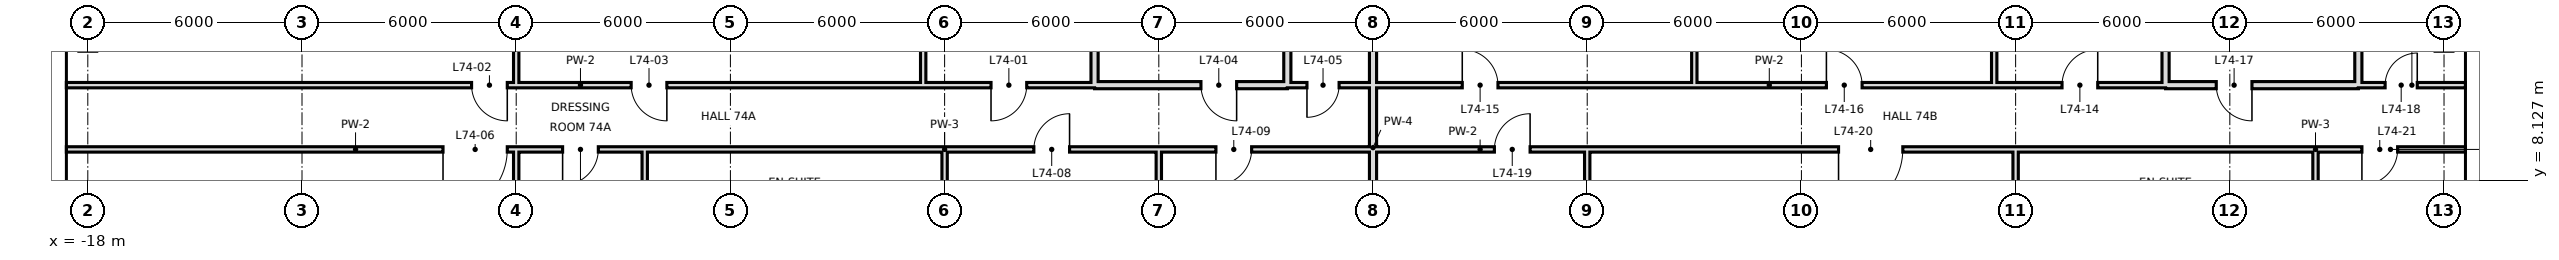
"""IFC4 building model, lengths in metres.
Left out: names, types, materials, properties, quantities, classifications, styles, units other than length and angle.
Written with IfcOpenShell. Run it as: python <this file> out.ifc"""

import sys

from ifc_helpers import new_model, si_unit, direction, frame, frame_2d, origin, place, context, subcontext, project, spatial, rectangle, extrude, element, fill, save


model = new_model("IFC4")
c1 = context("Model", 3, precision=1e-05, world=origin(), true_north=direction((0.0, 1.0)))
c2 = subcontext(c1, "Body", "Model", "MODEL_VIEW")
j1 = project(units=[si_unit("LENGTHUNIT", "METRE"), si_unit("PLANEANGLEUNIT", "RADIAN")], contexts=[c1])
p1 = place(None, origin())
s1 = spatial("IfcSite", under=j1, at=p1, CompositionType="ELEMENT")
p2 = place(p1, origin())
s2 = spatial("IfcBuilding", under=s1, at=p2, CompositionType="ELEMENT")
p3 = place(p2, frame((0.0, 0.0, 312.4)))
s3 = spatial("IfcBuildingStorey", under=s2, at=p3, CompositionType="ELEMENT", Elevation=312.4)
p4 = place(p3, frame((-2.4, 6.0, 0.0), z_axis=(0.0, 0.0, 1.0), x_axis=(0.0, 1.0, 0.0)))
e1 = element("IfcWall", 1, at=p4, inside=s3, PredefinedType="PARTITIONING", context=c2, shape_type="SweptSolid", body=[
    extrude(rectangle(XDim=3.0, YDim=0.15, at=frame_2d((1.5, 0.0))), origin(), (0.0, 0.0, 1.0), 3.42),
])
p5 = place(p3, frame((-6.0, -0.6, 0.0), z_axis=(0.0, 0.0, 1.0), x_axis=(0.0, 1.0, 0.0)))
e2 = element("IfcWall", 2, at=p5, inside=s3, PredefinedType="PARTITIONING", context=c2, shape_type="SweptSolid", body=[
    extrude(rectangle(XDim=9.6, YDim=0.15, at=frame_2d((4.8, 0.0))), origin(), (0.0, 0.0, 1.0), 3.42),
])
p6 = place(p3, frame((-6.0, 10.8, 0.0), z_axis=(0.0, 0.0, 1.0), x_axis=(0.0, 1.0, 0.0)))
e3 = element("IfcWall", 3, at=p6, inside=s3, PredefinedType="PARTITIONING", context=c2, shape_type="SweptSolid", body=[
    extrude(rectangle(XDim=7.2, YDim=0.15, at=frame_2d((3.6, 0.0))), origin(), (0.0, 0.0, 1.0), 3.42),
])
p7 = place(p3, frame((10.2, 10.8, 0.0), z_axis=(0.0, 0.0, 1.0), x_axis=(0.0, 1.0, 0.0)))
e4 = element("IfcWall", 4, at=p7, inside=s3, PredefinedType="SOLIDWALL", context=c2, shape_type="SweptSolid", body=[
    extrude(rectangle(XDim=7.9, YDim=0.2, at=frame_2d((3.95, 0.0))), origin(), (0.0, 0.0, 1.0), 2.72),
])
p8 = place(p3, frame((12.0, 0.0, 0.0), z_axis=(0.0, 0.0, 1.0), x_axis=(0.0, 1.0, 0.0)))
e5 = element("IfcWall", 5, at=p8, inside=s3, PredefinedType="PARTITIONING", context=c2, shape_type="SweptSolid", body=[
    extrude(rectangle(XDim=9.0, YDim=0.15, at=frame_2d((4.5, 0.0))), origin(), (0.0, 0.0, 1.0), 2.72),
])
p9 = place(p3, frame((15.6, 10.8, 0.0), z_axis=(0.0, 0.0, 1.0), x_axis=(0.0, 1.0, 0.0)))
e6 = element("IfcWall", 6, at=p9, inside=s3, PredefinedType="SOLIDWALL", context=c2, shape_type="SweptSolid", body=[
    extrude(rectangle(XDim=7.9, YDim=0.2, at=frame_2d((3.95, 0.0))), origin(), (0.0, 0.0, 1.0), 2.72),
])
p10 = place(p3, frame((18.0, -0.6, 0.0), z_axis=(0.0, 0.0, 1.0), x_axis=(0.0, 1.0, 0.0)))
e7 = element("IfcWall", 7, at=p10, inside=s3, PredefinedType="SOLIDWALL", context=c2, shape_type="SweptSolid", body=[
    extrude(rectangle(XDim=19.3, YDim=0.2, at=frame_2d((9.65, 0.0))), origin(), (0.0, 0.0, 1.0), 2.72),
])
p11 = place(p3, frame((24.0, 0.0, 0.0), z_axis=(0.0, 0.0, 1.0), x_axis=(0.0, 1.0, 0.0)))
e8 = element("IfcWall", 8, at=p11, inside=s3, PredefinedType="PARTITIONING", context=c2, shape_type="SweptSolid", body=[
    extrude(rectangle(XDim=9.0, YDim=0.15, at=frame_2d((4.5, 0.0))), origin(), (0.0, 0.0, 1.0), 2.72),
])
for number, where, z_axis, x_axis in (
    (9, (27.0, 10.8, 0.0), (0.0, 0.0, 1.0), (0.0, 1.0, 0.0)),
    (10, (35.4, 10.8, 0.0), (0.0, 0.0, 1.0), (0.0, 1.0, 0.0)),
):
    element("IfcWall", number, at=place(p3, frame(where, z_axis=z_axis, x_axis=x_axis)), inside=s3, PredefinedType="PARTITIONING", context=c2, shape_type="SweptSolid", body=[
        extrude(rectangle(XDim=7.9, YDim=0.15, at=frame_2d((3.95, 0.0))), origin(), (0.0, 0.0, 1.0), 3.42),
    ])
p12 = place(p3, frame((36.0, 6.0, 0.0), z_axis=(0.0, 0.0, 1.0), x_axis=(0.0, 1.0, 0.0)))
e11 = element("IfcWall", 11, at=p12, inside=s3, PredefinedType="PARTITIONING", context=c2, shape_type="SweptSolid", body=[
    extrude(rectangle(XDim=3.0, YDim=0.15, at=frame_2d((1.5, 0.0))), origin(), (0.0, 0.0, 1.0), 2.72),
])
p13 = place(p3, frame((40.2, 10.8, 0.0), z_axis=(0.0, 0.0, 1.0), x_axis=(0.0, 1.0, 0.0)))
e12 = element("IfcWall", 12, at=p13, inside=s3, PredefinedType="SOLIDWALL", context=c2, shape_type="SweptSolid", body=[
    extrude(rectangle(XDim=7.9, YDim=0.2, at=frame_2d((3.95, 0.0))), origin(), (0.0, 0.0, 1.0), 2.72),
])
p14 = place(p3, frame((44.4, 6.0, 0.0), z_axis=(0.0, 0.0, 1.0), x_axis=(0.0, 1.0, 0.0)))
e13 = element("IfcWall", 13, at=p14, inside=s3, PredefinedType="PARTITIONING", context=c2, shape_type="SweptSolid", body=[
    extrude(rectangle(XDim=3.0, YDim=0.15, at=frame_2d((1.5, 0.0))), origin(), (0.0, 0.0, 1.0), 3.42),
])
p15 = place(p3, frame((45.6, 10.8, 0.0), z_axis=(0.0, 0.0, 1.0), x_axis=(0.0, 1.0, 0.0)))
e14 = element("IfcWall", 14, at=p15, inside=s3, PredefinedType="SOLIDWALL", context=c2, shape_type="SweptSolid", body=[
    extrude(rectangle(XDim=7.2, YDim=0.2, at=frame_2d((3.6, 0.0))), origin(), (0.0, 0.0, 1.0), 2.72),
])
p16 = place(p3, frame((5.4, 10.8, 0.0), z_axis=(0.0, 0.0, 1.0), x_axis=(0.0, 1.0, 0.0)))
e15 = element("IfcWall", 15, at=p16, inside=s3, PredefinedType="PARTITIONING", context=c2, shape_type="SweptSolid", body=[
    extrude(rectangle(XDim=7.9, YDim=0.15, at=frame_2d((3.95, 0.0))), origin(), (0.0, 0.0, 1.0), 3.42),
])
p17 = place(p3, frame((6.0, 6.0, 0.0), z_axis=(0.0, 0.0, 1.0), x_axis=(0.0, 1.0, 0.0)))
e16 = element("IfcWall", 16, at=p17, inside=s3, PredefinedType="PARTITIONING", context=c2, shape_type="SweptSolid", body=[
    extrude(rectangle(XDim=3.0, YDim=0.15, at=frame_2d((1.5, 0.0))), origin(), (0.0, 0.0, 1.0), 2.72),
])
p18 = place(p3, frame((10.2, 10.8, 0.0), z_axis=(0.0, 0.0, 1.0), x_axis=(1.0, 0.0, 0.0)))
e17 = element("IfcWall", 17, at=p18, inside=s3, PredefinedType="SOLIDWALL", context=c2, shape_type="SweptSolid", body=[
    extrude(rectangle(XDim=5.4, YDim=0.2, at=frame_2d((2.7, 0.0))), origin(), (0.0, 0.0, 1.0), 2.72),
])
p19 = place(p18, frame((2.98, 0.0, 0.0)))
e18 = element("IfcOpeningElement", 18, at=p19, cuts=e17, PredefinedType="OPENING", context=c2, shape_type="SweptSolid", body=[
    extrude(rectangle(XDim=1.0, YDim=2.4, at=frame_2d((0.5, 1.2))), frame((0.0, 0.11, 0.0), z_axis=(0.0, -1.0, 0.0), x_axis=(1.0, 0.0, 0.0)), (0.0, 0.0, 1.0), 0.22),
])
p20 = place(p3, frame((40.2, 10.8, 0.0), z_axis=(0.0, 0.0, 1.0), x_axis=(1.0, 0.0, 0.0)))
e19 = element("IfcWall", 19, at=p20, inside=s3, PredefinedType="SOLIDWALL", context=c2, shape_type="SweptSolid", body=[
    extrude(rectangle(XDim=5.4, YDim=0.2, at=frame_2d((2.7, 0.0))), origin(), (0.0, 0.0, 1.0), 2.72),
])
p21 = place(p20, frame((1.42, 0.0, 0.0)))
e20 = element("IfcOpeningElement", 20, at=p21, cuts=e19, PredefinedType="OPENING", context=c2, shape_type="SweptSolid", body=[
    extrude(rectangle(XDim=1.0, YDim=2.4, at=frame_2d((0.5, 1.2))), frame((0.0, 0.11, 0.0), z_axis=(0.0, -1.0, 0.0), x_axis=(1.0, 0.0, 0.0)), (0.0, 0.0, 1.0), 0.22),
])
p22 = place(p3, frame((-18.6, 10.8, 0.0), z_axis=(0.0, 0.0, 1.0), x_axis=(1.0, 0.0, 0.0)))
e21 = element("IfcWall", 21, at=p22, inside=s3, PredefinedType="PARTITIONING", context=c2, shape_type="SweptSolid", body=[
    extrude(rectangle(XDim=28.8, YDim=0.15, at=frame_2d((14.4, 0.0))), origin(), (0.0, 0.0, 1.0), 3.42),
])
p23 = place(p22, frame((25.9, 0.0, 0.0)))
e22 = element("IfcOpeningElement", 22, at=p23, cuts=e21, PredefinedType="OPENING", context=c2, shape_type="SweptSolid", body=[
    extrude(rectangle(XDim=1.0, YDim=2.4, at=frame_2d((0.5, 1.2))), frame((0.0, 0.085, 0.0), z_axis=(0.0, -1.0, 0.0), x_axis=(1.0, 0.0, 0.0)), (0.0, 0.0, 1.0), 0.17),
])
p24 = place(p22, frame((11.35, 0.0, 0.0)))
e23 = element("IfcOpeningElement", 23, at=p24, cuts=e21, PredefinedType="OPENING", context=c2, shape_type="SweptSolid", body=[
    extrude(rectangle(XDim=1.0, YDim=2.4, at=frame_2d((0.5, 1.2))), frame((0.0, 0.085, 0.0), z_axis=(0.0, -1.0, 0.0), x_axis=(1.0, 0.0, 0.0)), (0.0, 0.0, 1.0), 0.17),
])
p25 = place(p22, frame((15.82, 0.0, 0.0)))
e24 = element("IfcOpeningElement", 24, at=p25, cuts=e21, PredefinedType="OPENING", context=c2, shape_type="SweptSolid", body=[
    extrude(rectangle(XDim=1.0, YDim=2.4, at=frame_2d((0.5, 1.2))), frame((0.0, 0.085, 0.0), z_axis=(0.0, -1.0, 0.0), x_axis=(1.0, 0.0, 0.0)), (0.0, 0.0, 1.0), 0.17),
])
p26 = place(p3, frame((18.0, 10.8, 0.0), z_axis=(0.0, 0.0, 1.0), x_axis=(1.0, 0.0, 0.0)))
e25 = element("IfcWall", 25, at=p26, inside=s3, PredefinedType="PARTITIONING", context=c2, shape_type="SweptSolid", body=[
    extrude(rectangle(XDim=22.2, YDim=0.15, at=frame_2d((11.1, 0.0))), origin(), (0.0, 0.0, 1.0), 3.42),
])
p27 = place(p26, frame((19.3, 0.0, 0.0)))
e26 = element("IfcOpeningElement", 26, at=p27, cuts=e25, PredefinedType="OPENING", context=c2, shape_type="SweptSolid", body=[
    extrude(rectangle(XDim=1.0, YDim=2.4, at=frame_2d((0.5, 1.2))), frame((0.0, 0.085, 0.0), z_axis=(0.0, -1.0, 0.0), x_axis=(1.0, 0.0, 0.0)), (0.0, 0.0, 1.0), 0.17),
])
p28 = place(p26, frame((2.5, 0.0, 0.0)))
e27 = element("IfcOpeningElement", 27, at=p28, cuts=e25, PredefinedType="OPENING", context=c2, shape_type="SweptSolid", body=[
    extrude(rectangle(XDim=1.0, YDim=2.4, at=frame_2d((0.5, 1.2))), frame((0.0, 0.085, 0.0), z_axis=(0.0, -1.0, 0.0), x_axis=(1.0, 0.0, 0.0)), (0.0, 0.0, 1.0), 0.17),
])
p29 = place(p26, frame((12.7, 0.0, 0.0)))
e28 = element("IfcOpeningElement", 28, at=p29, cuts=e25, PredefinedType="OPENING", context=c2, shape_type="SweptSolid", body=[
    extrude(rectangle(XDim=1.0, YDim=2.4, at=frame_2d((0.5, 1.2))), frame((0.0, 0.085, 0.0), z_axis=(0.0, -1.0, 0.0), x_axis=(1.0, 0.0, 0.0)), (0.0, 0.0, 1.0), 0.17),
])
p30 = place(p3, frame((15.6, 10.8, 0.0), z_axis=(0.0, 0.0, 1.0), x_axis=(1.0, 0.0, 0.0)))
e29 = element("IfcWall", 29, at=p30, inside=s3, PredefinedType="PARTITIONING", context=c2, shape_type="SweptSolid", body=[
    extrude(rectangle(XDim=2.4, YDim=0.15, at=frame_2d((1.2, 0.0))), origin(), (0.0, 0.0, 1.0), 3.42),
])
p31 = place(p30, frame((0.55, 0.0, 0.0)))
e30 = element("IfcOpeningElement", 30, at=p31, cuts=e29, PredefinedType="OPENING", context=c2, shape_type="SweptSolid", body=[
    extrude(rectangle(XDim=0.9, YDim=2.4, at=frame_2d((0.45, 1.2))), frame((0.0, 0.085, 0.0), z_axis=(0.0, -1.0, 0.0), x_axis=(1.0, 0.0, 0.0)), (0.0, 0.0, 1.0), 0.17),
])
p32 = place(p3, frame((45.6, 10.8, 0.0), z_axis=(0.0, 0.0, 1.0), x_axis=(1.0, 0.0, 0.0)))
e31 = element("IfcWall", 31, at=p32, inside=s3, PredefinedType="PARTITIONING", context=c2, shape_type="SweptSolid", body=[
    extrude(rectangle(XDim=3.0, YDim=0.15, at=frame_2d((1.5, 0.0))), origin(), (0.0, 0.0, 1.0), 3.42),
])
p33 = place(p32, frame((0.75, 0.0, 0.0)))
e32 = element("IfcOpeningElement", 32, at=p33, cuts=e31, PredefinedType="OPENING", context=c2, shape_type="SweptSolid", body=[
    extrude(rectangle(XDim=0.9, YDim=2.4, at=frame_2d((0.45, 1.2))), frame((0.0, 0.085, 0.0), z_axis=(0.0, -1.0, 0.0), x_axis=(1.0, 0.0, 0.0)), (0.0, 0.0, 1.0), 0.17),
])
p34 = place(p3, frame((-18.6, 9.0, 0.0), z_axis=(0.0, 0.0, 1.0), x_axis=(1.0, 0.0, 0.0)))
e33 = element("IfcWall", 33, at=p34, inside=s3, PredefinedType="PARTITIONING", context=c2, shape_type="SweptSolid", body=[
    extrude(rectangle(XDim=16.2, YDim=0.15, at=frame_2d((8.1, 0.0))), origin(), (0.0, 0.0, 1.0), 3.42),
])
p35 = place(p34, frame((10.55, 0.0, 0.0)))
e34 = element("IfcOpeningElement", 34, at=p35, cuts=e33, PredefinedType="OPENING", context=c2, shape_type="SweptSolid", body=[
    extrude(rectangle(XDim=1.8, YDim=2.4, at=frame_2d((0.9, 1.2))), frame((0.0, 0.085, 0.0), z_axis=(0.0, -1.0, 0.0), x_axis=(1.0, 0.0, 0.0)), (0.0, 0.0, 1.0), 0.17),
])
p36 = place(p34, frame((13.9, 0.0, 0.0)))
e35 = element("IfcOpeningElement", 35, at=p36, cuts=e33, PredefinedType="OPENING", context=c2, shape_type="SweptSolid", body=[
    extrude(rectangle(XDim=1.0, YDim=2.4, at=frame_2d((0.5, 1.2))), frame((0.0, 0.085, 0.0), z_axis=(0.0, -1.0, 0.0), x_axis=(1.0, 0.0, 0.0)), (0.0, 0.0, 1.0), 0.17),
])
p37 = place(p3, frame((6.0, 9.0, 0.0), z_axis=(0.0, 0.0, 1.0), x_axis=(1.0, 0.0, 0.0)))
e36 = element("IfcWall", 36, at=p37, inside=s3, PredefinedType="PARTITIONING", context=c2, shape_type="SweptSolid", body=[
    extrude(rectangle(XDim=30.0, YDim=0.15, at=frame_2d((15.0, 0.0))), origin(), (0.0, 0.0, 1.0), 3.42),
])
p38 = place(p37, frame((2.5, 0.0, 0.0)))
e37 = element("IfcOpeningElement", 37, at=p38, cuts=e36, PredefinedType="OPENING", context=c2, shape_type="SweptSolid", body=[
    extrude(rectangle(XDim=1.0, YDim=2.4, at=frame_2d((0.5, 1.2))), frame((0.0, 0.085, 0.0), z_axis=(0.0, -1.0, 0.0), x_axis=(1.0, 0.0, 0.0)), (0.0, 0.0, 1.0), 0.17),
])
p39 = place(p37, frame((7.6, 0.0, 0.0)))
e38 = element("IfcOpeningElement", 38, at=p39, cuts=e36, PredefinedType="OPENING", context=c2, shape_type="SweptSolid", body=[
    extrude(rectangle(XDim=1.0, YDim=2.4, at=frame_2d((0.5, 1.2))), frame((0.0, 0.085, 0.0), z_axis=(0.0, -1.0, 0.0), x_axis=(1.0, 0.0, 0.0)), (0.0, 0.0, 1.0), 0.17),
])
p40 = place(p37, frame((15.4, 0.0, 0.0)))
e39 = element("IfcOpeningElement", 39, at=p40, cuts=e36, PredefinedType="OPENING", context=c2, shape_type="SweptSolid", body=[
    extrude(rectangle(XDim=1.0, YDim=2.4, at=frame_2d((0.5, 1.2))), frame((0.0, 0.085, 0.0), z_axis=(0.0, -1.0, 0.0), x_axis=(1.0, 0.0, 0.0)), (0.0, 0.0, 1.0), 0.17),
])
p41 = place(p37, frame((25.04, 0.0, 0.0)))
e40 = element("IfcOpeningElement", 40, at=p41, cuts=e36, PredefinedType="OPENING", context=c2, shape_type="SweptSolid", body=[
    extrude(rectangle(XDim=1.8, YDim=2.4, at=frame_2d((0.9, 1.2))), frame((0.0, 0.085, 0.0), z_axis=(0.0, -1.0, 0.0), x_axis=(1.0, 0.0, 0.0)), (0.0, 0.0, 1.0), 0.17),
])
p42 = place(p3, frame((44.4, 9.0, 0.0), z_axis=(0.0, 0.0, 1.0), x_axis=(1.0, 0.0, 0.0)))
e41 = element("IfcWall", 41, at=p42, inside=s3, PredefinedType="PARTITIONING", context=c2, shape_type="SweptSolid", body=[
    extrude(rectangle(XDim=4.2, YDim=0.15, at=frame_2d((2.1, 0.0))), origin(), (0.0, 0.0, 1.0), 3.42),
])
p43 = place(p42, frame((1.3, 0.0, 0.0)))
e42 = element("IfcOpeningElement", 42, at=p43, cuts=e41, PredefinedType="OPENING", context=c2, shape_type="SweptSolid", body=[
    extrude(rectangle(XDim=1.0, YDim=2.4, at=frame_2d((0.5, 1.2))), frame((0.0, 0.085, 0.0), z_axis=(0.0, -1.0, 0.0), x_axis=(1.0, 0.0, 0.0)), (0.0, 0.0, 1.0), 0.17),
])
for number, where, z_axis, x_axis in (
    (43, (-2.4, 9.0, 0.0), (0.0, 0.0, 1.0), (1.0, 0.0, 0.0)),
    (44, (36.0, 9.0, 0.0), (0.0, 0.0, 1.0), (1.0, 0.0, 0.0)),
):
    element("IfcWall", number, at=place(p3, frame(where, z_axis=z_axis, x_axis=x_axis)), inside=s3, PredefinedType="PARTITIONING", context=c2, shape_type="SweptSolid", body=[
        extrude(rectangle(XDim=8.4, YDim=0.15, at=frame_2d((4.2, 0.0))), origin(), (0.0, 0.0, 1.0), 3.42),
    ])
p44 = place(p23, frame((1.0, 0.0, 0.0), z_axis=(0.0, 0.0, 1.0), x_axis=(-1.0, 0.0, 0.0)))
e45 = element("IfcDoor", 45, at=p44, inside=s3, OperationType="SINGLE_SWING_RIGHT", PredefinedType="DOOR", context=c2, shape_type="SweptSolid", body=[
    extrude(rectangle(XDim=1.0, YDim=2.4, at=frame_2d((0.5, 1.2))), frame((0.0, 0.025, 0.0), z_axis=(0.0, -1.0, 0.0), x_axis=(1.0, 0.0, 0.0)), (0.0, 0.0, 1.0), 0.05),
])
fill(e22, e45)
p45 = place(p24, origin())
e46 = element("IfcDoor", 46, at=p45, inside=s3, OperationType="SINGLE_SWING_RIGHT", PredefinedType="DOOR", context=c2, shape_type="SweptSolid", body=[
    extrude(rectangle(XDim=1.0, YDim=2.4, at=frame_2d((0.5, 1.2))), frame((0.0, 0.025, 0.0), z_axis=(0.0, -1.0, 0.0), x_axis=(1.0, 0.0, 0.0)), (0.0, 0.0, 1.0), 0.05),
])
fill(e23, e46)
p46 = place(p25, origin())
e47 = element("IfcDoor", 47, at=p46, inside=s3, OperationType="SINGLE_SWING_RIGHT", PredefinedType="DOOR", context=c2, shape_type="SweptSolid", body=[
    extrude(rectangle(XDim=1.0, YDim=2.4, at=frame_2d((0.5, 1.2))), frame((0.0, 0.025, 0.0), z_axis=(0.0, -1.0, 0.0), x_axis=(1.0, 0.0, 0.0)), (0.0, 0.0, 1.0), 0.05),
])
fill(e24, e47)
p47 = place(p19, origin())
e48 = element("IfcDoor", 48, at=p47, inside=s3, OperationType="SINGLE_SWING_RIGHT", PredefinedType="DOOR", context=c2, shape_type="SweptSolid", body=[
    extrude(rectangle(XDim=1.0, YDim=2.4, at=frame_2d((0.5, 1.2))), frame((0.0, 0.025, 0.0), z_axis=(0.0, -1.0, 0.0), x_axis=(1.0, 0.0, 0.0)), (0.0, 0.0, 1.0), 0.05),
])
fill(e18, e48)
p48 = place(p31, frame((0.9, 0.0, 0.0), z_axis=(0.0, 0.0, 1.0), x_axis=(-1.0, 0.0, 0.0)))
e49 = element("IfcDoor", 49, at=p48, inside=s3, OperationType="SINGLE_SWING_RIGHT", PredefinedType="DOOR", context=c2, shape_type="SweptSolid", body=[
    extrude(rectangle(XDim=0.9, YDim=2.4, at=frame_2d((0.45, 1.2))), frame((0.0, 0.025, 0.0), z_axis=(0.0, -1.0, 0.0), x_axis=(1.0, 0.0, 0.0)), (0.0, 0.0, 1.0), 0.05),
])
fill(e30, e49)
p49 = place(p35, frame((1.8, 0.0, 0.0), z_axis=(0.0, 0.0, 1.0), x_axis=(-1.0, 0.0, 0.0)))
e50 = element("IfcDoor", 50, at=p49, inside=s3, OperationType="SINGLE_SWING_RIGHT", PredefinedType="DOOR", context=c2, shape_type="SweptSolid", body=[
    extrude(rectangle(XDim=1.8, YDim=2.4, at=frame_2d((0.9, 1.2))), frame((0.0, 0.025, 0.0), z_axis=(0.0, -1.0, 0.0), x_axis=(1.0, 0.0, 0.0)), (0.0, 0.0, 1.0), 0.05),
])
fill(e34, e50)
p50 = place(p36, frame((1.0, 0.0, 0.0), z_axis=(0.0, 0.0, 1.0), x_axis=(-1.0, 0.0, 0.0)))
e51 = element("IfcDoor", 51, at=p50, inside=s3, OperationType="SINGLE_SWING_RIGHT", PredefinedType="DOOR", context=c2, shape_type="SweptSolid", body=[
    extrude(rectangle(XDim=1.0, YDim=2.4, at=frame_2d((0.5, 1.2))), frame((0.0, 0.025, 0.0), z_axis=(0.0, -1.0, 0.0), x_axis=(1.0, 0.0, 0.0)), (0.0, 0.0, 1.0), 0.05),
])
fill(e35, e51)
p51 = place(p38, frame((1.0, 0.0, 0.0), z_axis=(0.0, 0.0, 1.0), x_axis=(-1.0, 0.0, 0.0)))
e52 = element("IfcDoor", 52, at=p51, inside=s3, OperationType="SINGLE_SWING_LEFT", PredefinedType="DOOR", context=c2, shape_type="SweptSolid", body=[
    extrude(rectangle(XDim=1.0, YDim=2.4, at=frame_2d((0.5, 1.2))), frame((0.0, 0.025, 0.0), z_axis=(0.0, -1.0, 0.0), x_axis=(1.0, 0.0, 0.0)), (0.0, 0.0, 1.0), 0.05),
])
fill(e37, e52)
p52 = place(p39, frame((1.0, 0.0, 0.0), z_axis=(0.0, 0.0, 1.0), x_axis=(-1.0, 0.0, 0.0)))
e53 = element("IfcDoor", 53, at=p52, inside=s3, OperationType="SINGLE_SWING_RIGHT", PredefinedType="DOOR", context=c2, shape_type="SweptSolid", body=[
    extrude(rectangle(XDim=1.0, YDim=2.4, at=frame_2d((0.5, 1.2))), frame((0.0, 0.025, 0.0), z_axis=(0.0, -1.0, 0.0), x_axis=(1.0, 0.0, 0.0)), (0.0, 0.0, 1.0), 0.05),
])
fill(e38, e53)
p53 = place(p27, frame((1.0, 0.0, 0.0), z_axis=(0.0, 0.0, 1.0), x_axis=(-1.0, 0.0, 0.0)))
e54 = element("IfcDoor", 54, at=p53, inside=s3, OperationType="SINGLE_SWING_LEFT", PredefinedType="DOOR", context=c2, shape_type="SweptSolid", body=[
    extrude(rectangle(XDim=1.0, YDim=2.4, at=frame_2d((0.5, 1.2))), frame((0.0, 0.025, 0.0), z_axis=(0.0, -1.0, 0.0), x_axis=(1.0, 0.0, 0.0)), (0.0, 0.0, 1.0), 0.05),
])
fill(e26, e54)
p54 = place(p28, origin())
e55 = element("IfcDoor", 55, at=p54, inside=s3, OperationType="SINGLE_SWING_LEFT", PredefinedType="DOOR", context=c2, shape_type="SweptSolid", body=[
    extrude(rectangle(XDim=1.0, YDim=2.4, at=frame_2d((0.5, 1.2))), frame((0.0, 0.025, 0.0), z_axis=(0.0, -1.0, 0.0), x_axis=(1.0, 0.0, 0.0)), (0.0, 0.0, 1.0), 0.05),
])
fill(e27, e55)
p55 = place(p29, origin())
e56 = element("IfcDoor", 56, at=p55, inside=s3, OperationType="SINGLE_SWING_LEFT", PredefinedType="DOOR", context=c2, shape_type="SweptSolid", body=[
    extrude(rectangle(XDim=1.0, YDim=2.4, at=frame_2d((0.5, 1.2))), frame((0.0, 0.025, 0.0), z_axis=(0.0, -1.0, 0.0), x_axis=(1.0, 0.0, 0.0)), (0.0, 0.0, 1.0), 0.05),
])
fill(e28, e56)
p56 = place(p21, origin())
e57 = element("IfcDoor", 57, at=p56, inside=s3, OperationType="SINGLE_SWING_RIGHT", PredefinedType="DOOR", context=c2, shape_type="SweptSolid", body=[
    extrude(rectangle(XDim=1.0, YDim=2.4, at=frame_2d((0.5, 1.2))), frame((0.0, 0.025, 0.0), z_axis=(0.0, -1.0, 0.0), x_axis=(1.0, 0.0, 0.0)), (0.0, 0.0, 1.0), 0.05),
])
fill(e20, e57)
p57 = place(p33, frame((0.9, 0.0, 0.0), z_axis=(0.0, 0.0, 1.0), x_axis=(-1.0, 0.0, 0.0)))
e58 = element("IfcDoor", 58, at=p57, inside=s3, OperationType="SINGLE_SWING_LEFT", PredefinedType="DOOR", context=c2, shape_type="SweptSolid", body=[
    extrude(rectangle(XDim=0.9, YDim=2.4, at=frame_2d((0.45, 1.2))), frame((0.0, 0.025, 0.0), z_axis=(0.0, -1.0, 0.0), x_axis=(1.0, 0.0, 0.0)), (0.0, 0.0, 1.0), 0.05),
])
fill(e32, e58)
p58 = place(p40, frame((1.0, 0.0, 0.0), z_axis=(0.0, 0.0, 1.0), x_axis=(-1.0, 0.0, 0.0)))
e59 = element("IfcDoor", 59, at=p58, inside=s3, OperationType="SINGLE_SWING_LEFT", PredefinedType="DOOR", context=c2, shape_type="SweptSolid", body=[
    extrude(rectangle(XDim=1.0, YDim=2.4, at=frame_2d((0.5, 1.2))), frame((0.0, 0.025, 0.0), z_axis=(0.0, -1.0, 0.0), x_axis=(1.0, 0.0, 0.0)), (0.0, 0.0, 1.0), 0.05),
])
fill(e39, e59)
p59 = place(p41, frame((1.8, 0.0, 0.0), z_axis=(0.0, 0.0, 1.0), x_axis=(-1.0, 0.0, 0.0)))
e60 = element("IfcDoor", 60, at=p59, inside=s3, OperationType="SINGLE_SWING_RIGHT", PredefinedType="DOOR", context=c2, shape_type="SweptSolid", body=[
    extrude(rectangle(XDim=1.8, YDim=2.4, at=frame_2d((0.9, 1.2))), frame((0.0, 0.025, 0.0), z_axis=(0.0, -1.0, 0.0), x_axis=(1.0, 0.0, 0.0)), (0.0, 0.0, 1.0), 0.05),
])
fill(e40, e60)
p60 = place(p43, frame((1.0, 0.0, 0.0), z_axis=(0.0, 0.0, 1.0), x_axis=(-1.0, 0.0, 0.0)))
e61 = element("IfcDoor", 61, at=p60, inside=s3, OperationType="SINGLE_SWING_RIGHT", PredefinedType="DOOR", context=c2, shape_type="SweptSolid", body=[
    extrude(rectangle(XDim=1.0, YDim=2.4, at=frame_2d((0.5, 1.2))), frame((0.0, 0.025, 0.0), z_axis=(0.0, -1.0, 0.0), x_axis=(1.0, 0.0, 0.0)), (0.0, 0.0, 1.0), 0.05),
])
fill(e42, e61)
save(model, sys.argv[1])
